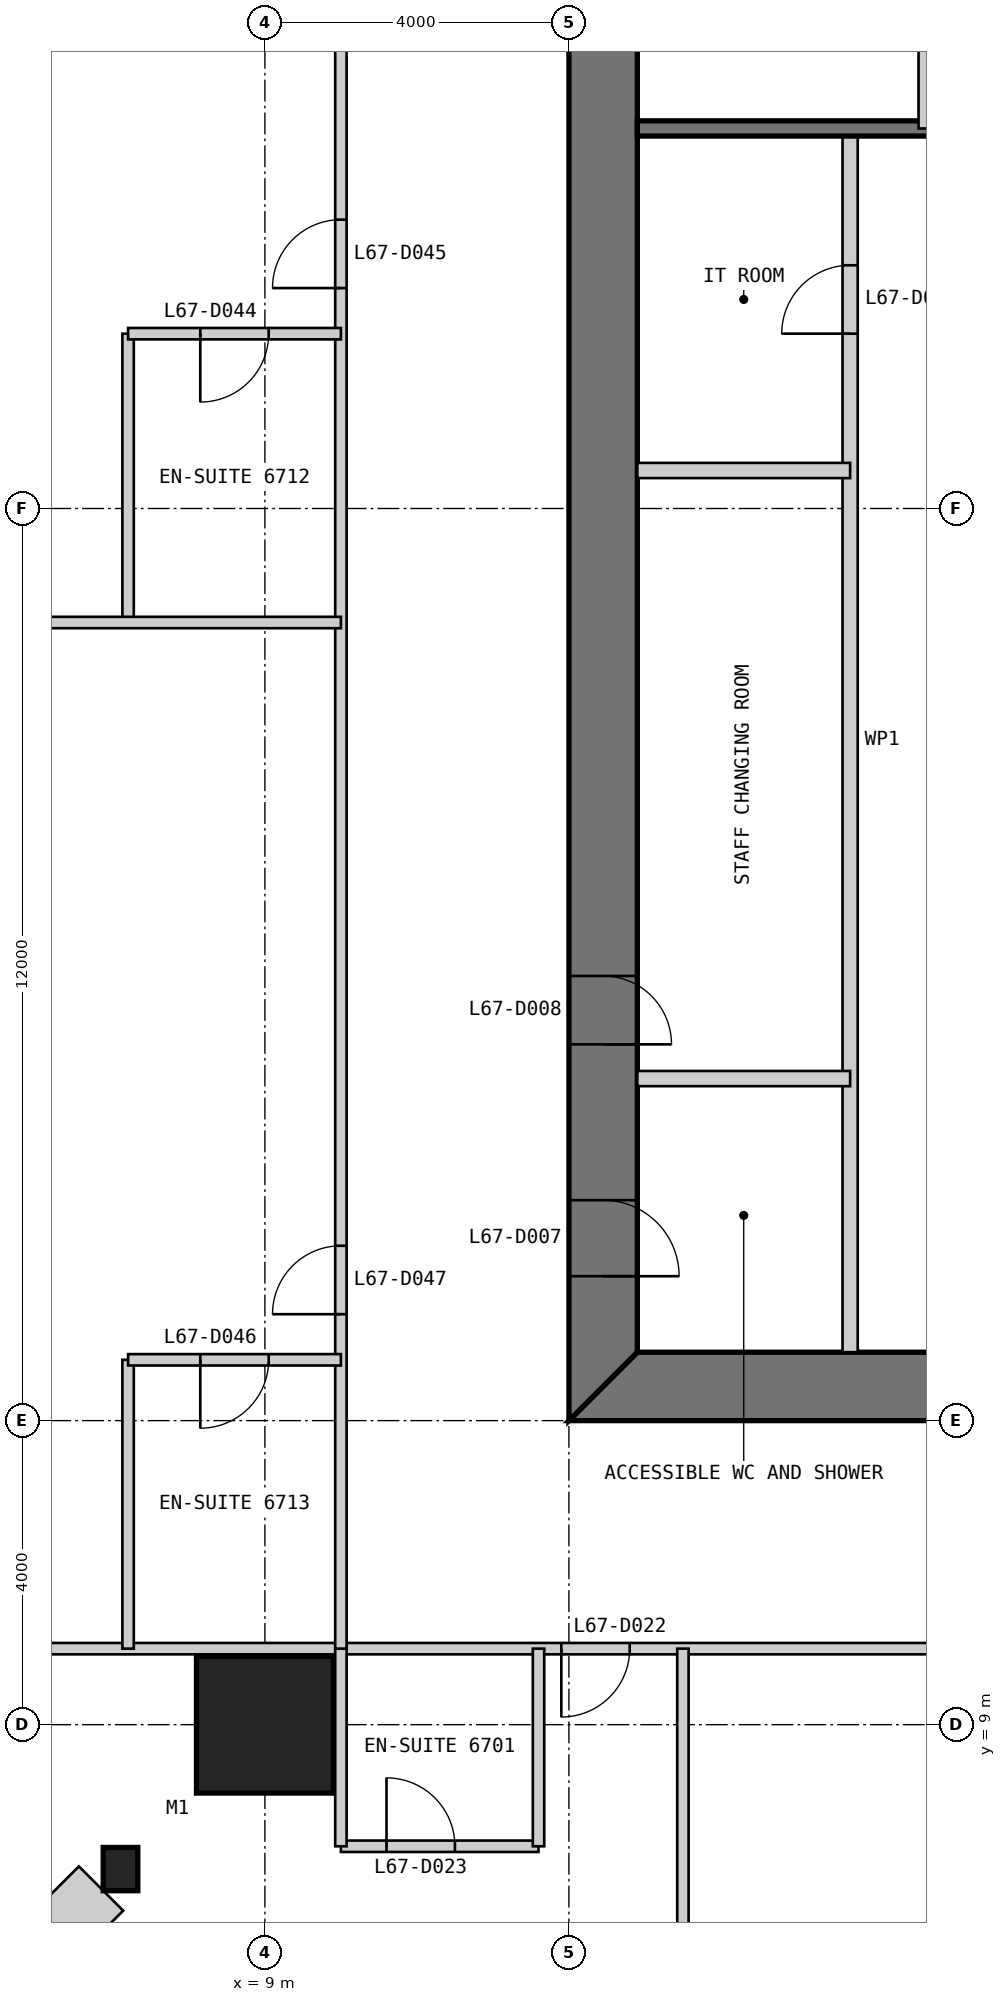
"""IFC4 building model, lengths in metres.
Left out: names, types, materials, properties, quantities, classifications, styles, units other than length and angle.
Written with IfcOpenShell. Run it as: python <this file> out.ifc"""

import sys

from ifc_helpers import new_model, si_unit, direction, frame, frame_2d, origin, origin_2d, place, context, subcontext, project, spatial, polyline, rectangle, i_section, outline, extrude, element, fill, save


model = new_model("IFC4")
c1 = context("Model", 3, precision=1e-05, world=origin(), true_north=direction((0.0, 1.0)))
c2 = subcontext(c1, "Body", "Model", "MODEL_VIEW")
j1 = project(units=[si_unit("LENGTHUNIT", "METRE"), si_unit("PLANEANGLEUNIT", "RADIAN")], contexts=[c1])
p1 = place(None, origin())
s1 = spatial("IfcSite", under=j1, at=p1, CompositionType="ELEMENT")
p2 = place(p1, origin())
s2 = spatial("IfcBuilding", under=s1, at=p2, CompositionType="ELEMENT")
p3 = place(p2, frame((0.0, 0.0, 279.8)))
s3 = spatial("IfcBuildingStorey", under=s2, at=p3, CompositionType="ELEMENT", Elevation=279.8)
p4 = place(p3, frame((9.0, 9.0, 0.0), z_axis=(0.0, 0.0, 1.0), x_axis=(1.0, 0.0, 0.0)))
e1 = element("IfcColumn", 1, at=p4, inside=s3, PredefinedType="COLUMN", context=c2, shape_type="SweptSolid", body=[
    extrude(rectangle(XDim=1.8, YDim=1.8, at=origin_2d()), origin(), (0.0, 0.0, 1.0), 3.4),
])
p5 = place(p3, frame((7.1, 7.1, 0.0), z_axis=(0.0, 0.0, 1.0), x_axis=(1.0, 0.0, 0.0)))
e2 = element("IfcColumn", 2, at=p5, inside=s3, PredefinedType="COLUMN", context=c2, shape_type="SweptSolid", body=[
    extrude(i_section(OverallWidth=0.455, OverallDepth=0.569, WebThickness=0.078, FlangeThickness=0.125, at=origin_2d()), origin(), (0.0, 0.0, 1.0), 3.4),
])
p6 = place(p3, frame((13.0, 13.45, 0.0), z_axis=(0.0, 0.0, 1.0), x_axis=(1.0, 0.0, 0.0)))
e3 = element("IfcWall", 3, at=p6, inside=s3, PredefinedType="SHEAR", context=c2, shape_type="SweptSolid", body=[
    extrude(outline(polyline([(0.0, -0.45), (24.0, -0.45), (23.1, 0.45), (0.9, 0.45), (0.0, -0.45)])), origin(), (0.0, 0.0, 1.0), 3.4),
])
p7 = place(p6, frame((4.9, 0.0, 0.0)))
e4 = element("IfcOpeningElement", 4, at=p7, cuts=e3, PredefinedType="OPENING", context=c2, shape_type="SweptSolid", body=[
    extrude(rectangle(XDim=1.0, YDim=2.2, at=frame_2d((0.5, 1.1))), frame((0.0, 0.46, 0.0), z_axis=(0.0, -1.0, 0.0), x_axis=(1.0, 0.0, 0.0)), (0.0, 0.0, 1.0), 0.92),
])
p8 = place(p6, frame((8.9, 0.0, 0.0)))
e5 = element("IfcOpeningElement", 5, at=p8, cuts=e3, PredefinedType="OPENING", context=c2, shape_type="SweptSolid", body=[
    extrude(rectangle(XDim=1.1, YDim=2.2, at=frame_2d((0.55, 1.1))), frame((0.0, 0.46, 0.0), z_axis=(0.0, -1.0, 0.0), x_axis=(1.0, 0.0, 0.0)), (0.0, 0.0, 1.0), 0.92),
])
p9 = place(p6, frame((15.05, 0.0, 0.0)))
e6 = element("IfcOpeningElement", 6, at=p9, cuts=e3, PredefinedType="OPENING", context=c2, shape_type="SweptSolid", body=[
    extrude(rectangle(XDim=0.9, YDim=2.2, at=frame_2d((0.45, 1.1))), frame((0.0, 0.46, 0.0), z_axis=(0.0, -1.0, 0.0), x_axis=(1.0, 0.0, 0.0)), (0.0, 0.0, 1.0), 0.92),
])
p10 = place(p6, frame((17.9, 0.0, 0.0)))
e7 = element("IfcOpeningElement", 7, at=p10, cuts=e3, PredefinedType="OPENING", context=c2, shape_type="SweptSolid", body=[
    extrude(rectangle(XDim=1.0, YDim=2.2, at=frame_2d((0.5, 1.1))), frame((0.0, 0.46, 0.0), z_axis=(0.0, -1.0, 0.0), x_axis=(1.0, 0.0, 0.0)), (0.0, 0.0, 1.0), 0.92),
])
p11 = place(p6, frame((21.4, 0.0, 0.0)))
e8 = element("IfcOpeningElement", 8, at=p11, cuts=e3, PredefinedType="OPENING", context=c2, shape_type="SweptSolid", body=[
    extrude(rectangle(XDim=1.0, YDim=2.2, at=frame_2d((0.5, 1.1))), frame((0.0, 0.46, 0.0), z_axis=(0.0, -1.0, 0.0), x_axis=(1.0, 0.0, 0.0)), (0.0, 0.0, 1.0), 0.92),
])
p12 = place(p3, frame((13.45, 36.1, 0.0), z_axis=(0.0, 0.0, 1.0), x_axis=(0.0, -1.0, 0.0)))
e9 = element("IfcWall", 9, at=p12, inside=s3, PredefinedType="SHEAR", context=c2, shape_type="SweptSolid", body=[
    extrude(outline(polyline([(-0.9, -0.45), (23.1, -0.45), (22.2, 0.45), (0.0, 0.45), (-0.9, -0.45)])), origin(), (0.0, 0.0, 1.0), 3.4),
])
p13 = place(p12, frame((20.2, 0.0, 0.0)))
e10 = element("IfcOpeningElement", 10, at=p13, cuts=e9, PredefinedType="OPENING", context=c2, shape_type="SweptSolid", body=[
    extrude(rectangle(XDim=1.0, YDim=2.2, at=frame_2d((0.5, 1.1))), frame((0.0, 0.46, 0.0), z_axis=(0.0, -1.0, 0.0), x_axis=(1.0, 0.0, 0.0)), (0.0, 0.0, 1.0), 0.92),
])
p14 = place(p12, frame((17.25, 0.0, 0.0)))
e11 = element("IfcOpeningElement", 11, at=p14, cuts=e9, PredefinedType="OPENING", context=c2, shape_type="SweptSolid", body=[
    extrude(rectangle(XDim=0.9, YDim=2.2, at=frame_2d((0.45, 1.1))), frame((0.0, 0.46, 0.0), z_axis=(0.0, -1.0, 0.0), x_axis=(1.0, 0.0, 0.0)), (0.0, 0.0, 1.0), 0.92),
])
p15 = place(p3, frame((16.7, 13.9, 0.0), z_axis=(0.0, 0.0, 1.0), x_axis=(0.0, 1.0, 0.0)))
e12 = element("IfcWall", 12, at=p15, inside=s3, PredefinedType="PARTITIONING", context=c2, shape_type="SweptSolid", body=[
    extrude(rectangle(XDim=16.1, YDim=0.2, at=frame_2d((8.05, 0.0))), origin(), (0.0, 0.0, 1.0), 3.2),
])
p16 = place(p15, frame((13.4, 0.0, 0.0)))
e13 = element("IfcOpeningElement", 13, at=p16, cuts=e12, PredefinedType="OPENING", context=c2, shape_type="SweptSolid", body=[
    extrude(rectangle(XDim=0.9, YDim=2.2, at=frame_2d((0.45, 1.1))), frame((0.0, 0.11, 0.0), z_axis=(0.0, -1.0, 0.0), x_axis=(1.0, 0.0, 0.0)), (0.0, 0.0, 1.0), 0.22),
])
for number, where, z_axis, x_axis in (
    (14, (13.9, 17.5, 0.0), (0.0, 0.0, 1.0), (1.0, 0.0, 0.0)),
    (15, (13.9, 25.5, 0.0), (0.0, 0.0, 1.0), (1.0, 0.0, 0.0)),
):
    element("IfcWall", number, at=place(p3, frame(where, z_axis=z_axis, x_axis=x_axis)), inside=s3, PredefinedType="PARTITIONING", context=c2, shape_type="SweptSolid", body=[
        extrude(rectangle(XDim=2.8, YDim=0.2, at=frame_2d((1.4, 0.0))), origin(), (0.0, 0.0, 1.0), 3.2),
    ])
p17 = place(p3, frame((29.7, 30.0, 0.0), z_axis=(0.0, 0.0, 1.0), x_axis=(-1.0, 0.0, 0.0)))
e16 = element("IfcWall", 16, at=p17, inside=s3, PredefinedType="SOLIDWALL", context=c2, shape_type="SweptSolid", body=[
    extrude(rectangle(XDim=15.8, YDim=0.2, at=frame_2d((7.9, 0.0))), origin(), (0.0, 0.0, 1.0), 3.2),
])
p18 = place(p3, frame((17.7, 36.1, 0.0), z_axis=(0.0, 0.0, 1.0), x_axis=(0.0, -1.0, 0.0)))
e17 = element("IfcWall", 17, at=p18, inside=s3, PredefinedType="PARTITIONING", context=c2, shape_type="SweptSolid", body=[
    extrude(rectangle(XDim=6.1, YDim=0.2, at=frame_2d((3.05, 0.0))), origin(), (0.0, 0.0, 1.0), 3.2),
])
p19 = place(p3, frame((10.0, 10.0, 0.0), z_axis=(0.0, 0.0, 1.0), x_axis=(1.0, 0.0, 0.0)))
e18 = element("IfcWall", 18, at=p19, inside=s3, PredefinedType="PARTITIONING", context=c2, shape_type="SweptSolid", body=[
    extrude(rectangle(XDim=30.0, YDim=0.15, at=frame_2d((15.0, 0.0))), origin(), (0.0, 0.0, 1.0), 3.25),
])
p20 = place(p19, frame((2.9, 0.0, 0.0)))
e19 = element("IfcOpeningElement", 19, at=p20, cuts=e18, PredefinedType="OPENING", context=c2, shape_type="SweptSolid", body=[
    extrude(rectangle(XDim=0.9, YDim=2.1, at=frame_2d((0.45, 1.05))), frame((0.0, 0.085, 0.0), z_axis=(0.0, -1.0, 0.0), x_axis=(1.0, 0.0, 0.0)), (0.0, 0.0, 1.0), 0.17),
])
p21 = place(p19, frame((11.2, 0.0, 0.0)))
e20 = element("IfcOpeningElement", 20, at=p21, cuts=e18, PredefinedType="OPENING", context=c2, shape_type="SweptSolid", body=[
    extrude(rectangle(XDim=0.9, YDim=2.1, at=frame_2d((0.45, 1.05))), frame((0.0, 0.085, 0.0), z_axis=(0.0, -1.0, 0.0), x_axis=(1.0, 0.0, 0.0)), (0.0, 0.0, 1.0), 0.17),
])
p22 = place(p19, frame((17.6, 0.0, 0.0)))
e21 = element("IfcOpeningElement", 21, at=p22, cuts=e18, PredefinedType="OPENING", context=c2, shape_type="SweptSolid", body=[
    extrude(rectangle(XDim=0.9, YDim=2.1, at=frame_2d((0.45, 1.05))), frame((0.0, 0.085, 0.0), z_axis=(0.0, -1.0, 0.0), x_axis=(1.0, 0.0, 0.0)), (0.0, 0.0, 1.0), 0.17),
])
p23 = place(p19, frame((26.3, 0.0, 0.0)))
e22 = element("IfcOpeningElement", 22, at=p23, cuts=e18, PredefinedType="OPENING", context=c2, shape_type="SweptSolid", body=[
    extrude(rectangle(XDim=1.0, YDim=2.1, at=frame_2d((0.5, 1.05))), frame((0.0, 0.085, 0.0), z_axis=(0.0, -1.0, 0.0), x_axis=(1.0, 0.0, 0.0)), (0.0, 0.0, 1.0), 0.17),
])
p24 = place(p3, frame((0.15, 10.0, 0.0), z_axis=(0.0, 0.0, 1.0), x_axis=(1.0, 0.0, 0.0)))
e23 = element("IfcWall", 23, at=p24, inside=s3, PredefinedType="PARTITIONING", context=c2, shape_type="SweptSolid", body=[
    extrude(rectangle(XDim=9.85, YDim=0.15, at=frame_2d((4.925, 0.0))), origin(), (0.0, 0.0, 1.0), 3.25),
])
p25 = place(p3, frame((10.0, 7.4, 0.0), z_axis=(0.0, 0.0, 1.0), x_axis=(1.0, 0.0, 0.0)))
e24 = element("IfcWall", 24, at=p25, inside=s3, PredefinedType="PARTITIONING", context=c2, shape_type="SweptSolid", body=[
    extrude(rectangle(XDim=2.6, YDim=0.15, at=frame_2d((1.3, 0.0))), origin(), (0.0, 0.0, 1.0), 3.25),
])
p26 = place(p25, frame((0.6, 0.0, 0.0)))
e25 = element("IfcOpeningElement", 25, at=p26, cuts=e24, PredefinedType="OPENING", context=c2, shape_type="SweptSolid", body=[
    extrude(rectangle(XDim=0.9, YDim=2.1, at=frame_2d((0.45, 1.05))), frame((0.0, 0.085, 0.0), z_axis=(0.0, -1.0, 0.0), x_axis=(1.0, 0.0, 0.0)), (0.0, 0.0, 1.0), 0.17),
])
for number, where, z_axis, x_axis in (
    (26, (10.0, 7.4, 0.0), (0.0, 0.0, 1.0), (0.0, 1.0, 0.0)),
    (27, (12.6, 7.4, 0.0), (0.0, 0.0, 1.0), (0.0, 1.0, 0.0)),
):
    element("IfcWall", number, at=place(p3, frame(where, z_axis=z_axis, x_axis=x_axis)), inside=s3, PredefinedType="PARTITIONING", context=c2, shape_type="SweptSolid", body=[
        extrude(rectangle(XDim=2.6, YDim=0.15, at=frame_2d((1.3, 0.0))), origin(), (0.0, 0.0, 1.0), 3.25),
    ])
p27 = place(p3, frame((14.5, 0.15, 0.0), z_axis=(0.0, 0.0, 1.0), x_axis=(0.0, 1.0, 0.0)))
e28 = element("IfcWall", 28, at=p27, inside=s3, PredefinedType="PARTITIONING", context=c2, shape_type="SweptSolid", body=[
    extrude(rectangle(XDim=9.85, YDim=0.15, at=frame_2d((4.925, 0.0))), origin(), (0.0, 0.0, 1.0), 3.25),
])
p28 = place(p3, frame((10.0, 40.0, 0.0), z_axis=(0.0, 0.0, 1.0), x_axis=(0.0, -1.0, 0.0)))
e29 = element("IfcWall", 29, at=p28, inside=s3, PredefinedType="PARTITIONING", context=c2, shape_type="SweptSolid", body=[
    extrude(rectangle(XDim=30.0, YDim=0.15, at=frame_2d((15.0, 0.0))), origin(), (0.0, 0.0, 1.0), 2.638),
])
p29 = place(p28, frame((2.9, 0.0, 0.0)))
e30 = element("IfcOpeningElement", 30, at=p29, cuts=e29, PredefinedType="OPENING", context=c2, shape_type="SweptSolid", body=[
    extrude(rectangle(XDim=0.9, YDim=2.1, at=frame_2d((0.45, 1.05))), frame((0.0, 0.085, 0.0), z_axis=(0.0, -1.0, 0.0), x_axis=(1.0, 0.0, 0.0)), (0.0, 0.0, 1.0), 0.17),
])
p30 = place(p28, frame((11.2, 0.0, 0.0)))
e31 = element("IfcOpeningElement", 31, at=p30, cuts=e29, PredefinedType="OPENING", context=c2, shape_type="SweptSolid", body=[
    extrude(rectangle(XDim=0.9, YDim=2.1, at=frame_2d((0.45, 1.05))), frame((0.0, 0.085, 0.0), z_axis=(0.0, -1.0, 0.0), x_axis=(1.0, 0.0, 0.0)), (0.0, 0.0, 1.0), 0.17),
])
p31 = place(p28, frame((24.7, 0.0, 0.0)))
e32 = element("IfcOpeningElement", 32, at=p31, cuts=e29, PredefinedType="OPENING", context=c2, shape_type="SweptSolid", body=[
    extrude(rectangle(XDim=0.9, YDim=2.1, at=frame_2d((0.45, 1.05))), frame((0.0, 0.085, 0.0), z_axis=(0.0, -1.0, 0.0), x_axis=(1.0, 0.0, 0.0)), (0.0, 0.0, 1.0), 0.17),
])
p32 = place(p3, frame((7.2, 27.3, 0.0), z_axis=(0.0, 0.0, 1.0), x_axis=(0.0, -1.0, 0.0)))
e33 = element("IfcWall", 33, at=p32, inside=s3, PredefinedType="PARTITIONING", context=c2, shape_type="SweptSolid", body=[
    extrude(rectangle(XDim=3.8, YDim=0.15, at=frame_2d((1.9, 0.0))), origin(), (0.0, 0.0, 1.0), 3.25),
])
p33 = place(p3, frame((7.2, 27.3, 0.0), z_axis=(0.0, 0.0, 1.0), x_axis=(1.0, 0.0, 0.0)))
e34 = element("IfcWall", 34, at=p33, inside=s3, PredefinedType="PARTITIONING", context=c2, shape_type="SweptSolid", body=[
    extrude(rectangle(XDim=2.8, YDim=0.15, at=frame_2d((1.4, 0.0))), origin(), (0.0, 0.0, 1.0), 3.25),
])
p34 = place(p33, frame((0.95, 0.0, 0.0)))
e35 = element("IfcOpeningElement", 35, at=p34, cuts=e34, PredefinedType="OPENING", context=c2, shape_type="SweptSolid", body=[
    extrude(rectangle(XDim=0.9, YDim=2.1, at=frame_2d((0.45, 1.05))), frame((0.0, 0.085, 0.0), z_axis=(0.0, -1.0, 0.0), x_axis=(1.0, 0.0, 0.0)), (0.0, 0.0, 1.0), 0.17),
])
p35 = place(p3, frame((0.15, 23.5, 0.0), z_axis=(0.0, 0.0, 1.0), x_axis=(1.0, 0.0, 0.0)))
e36 = element("IfcWall", 36, at=p35, inside=s3, PredefinedType="PARTITIONING", context=c2, shape_type="SweptSolid", body=[
    extrude(rectangle(XDim=9.85, YDim=0.15, at=frame_2d((4.925, 0.0))), origin(), (0.0, 0.0, 1.0), 3.25),
])
p36 = place(p3, frame((7.2, 13.8, 0.0), z_axis=(0.0, 0.0, 1.0), x_axis=(0.0, -1.0, 0.0)))
e37 = element("IfcWall", 37, at=p36, inside=s3, PredefinedType="PARTITIONING", context=c2, shape_type="SweptSolid", body=[
    extrude(rectangle(XDim=3.8, YDim=0.15, at=frame_2d((1.9, 0.0))), origin(), (0.0, 0.0, 1.0), 3.25),
])
p37 = place(p3, frame((7.2, 13.8, 0.0), z_axis=(0.0, 0.0, 1.0), x_axis=(1.0, 0.0, 0.0)))
e38 = element("IfcWall", 38, at=p37, inside=s3, PredefinedType="PARTITIONING", context=c2, shape_type="SweptSolid", body=[
    extrude(rectangle(XDim=2.8, YDim=0.15, at=frame_2d((1.4, 0.0))), origin(), (0.0, 0.0, 1.0), 3.25),
])
p38 = place(p37, frame((0.95, 0.0, 0.0)))
e39 = element("IfcOpeningElement", 39, at=p38, cuts=e38, PredefinedType="OPENING", context=c2, shape_type="SweptSolid", body=[
    extrude(rectangle(XDim=0.9, YDim=2.1, at=frame_2d((0.45, 1.05))), frame((0.0, 0.085, 0.0), z_axis=(0.0, -1.0, 0.0), x_axis=(1.0, 0.0, 0.0)), (0.0, 0.0, 1.0), 0.17),
])
p39 = place(p3, frame((6.134, 6.134, 0.0), z_axis=(0.0, 0.0, 1.0), x_axis=(0.707106781187, 0.707106781187, 0.0)))
e40 = element("IfcWall", 40, at=p39, inside=s3, PredefinedType="PARTITIONING", context=c2, shape_type="SweptSolid", body=[
    extrude(rectangle(XDim=1.004, YDim=0.824, at=frame_2d((0.502, 0.0))), origin(), (0.0, 0.0, 1.0), 3.25),
])
p40 = place(p13, origin())
e41 = element("IfcDoor", 41, at=p40, inside=s3, OperationType="SINGLE_SWING_RIGHT", PredefinedType="DOOR", context=c2, shape_type="SweptSolid", body=[
    extrude(rectangle(XDim=1.0, YDim=2.2, at=frame_2d((0.5, 1.1))), frame((0.0, 0.025, 0.0), z_axis=(0.0, -1.0, 0.0), x_axis=(1.0, 0.0, 0.0)), (0.0, 0.0, 1.0), 0.05),
    extrude(outline(polyline([(0.0, 0.0), (0.04, 0.0), (0.04, 2.16), (0.96, 2.16), (0.96, 0.0), (1.0, 0.0), (1.0, 2.2), (0.0, 2.2), (0.0, 0.0)])), frame((0.0, 0.3, 0.0), z_axis=(0.0, -1.0, 0.0), x_axis=(1.0, 0.0, 0.0)), (0.0, 0.0, 1.0), 0.6),
])
fill(e10, e41)
p41 = place(p14, origin())
e42 = element("IfcDoor", 42, at=p41, inside=s3, OperationType="SINGLE_SWING_RIGHT", PredefinedType="DOOR", context=c2, shape_type="SweptSolid", body=[
    extrude(rectangle(XDim=0.9, YDim=2.2, at=frame_2d((0.45, 1.1))), frame((0.0, 0.025, 0.0), z_axis=(0.0, -1.0, 0.0), x_axis=(1.0, 0.0, 0.0)), (0.0, 0.0, 1.0), 0.05),
    extrude(outline(polyline([(0.0, 0.0), (0.04, 0.0), (0.04, 2.16), (0.86, 2.16), (0.86, 0.0), (0.9, 0.0), (0.9, 2.2), (0.0, 2.2), (0.0, 0.0)])), frame((0.0, 0.3, 0.0), z_axis=(0.0, -1.0, 0.0), x_axis=(1.0, 0.0, 0.0)), (0.0, 0.0, 1.0), 0.6),
])
fill(e11, e42)
p42 = place(p16, origin())
e43 = element("IfcDoor", 43, at=p42, inside=s3, OperationType="SINGLE_SWING_LEFT", PredefinedType="DOOR", context=c2, shape_type="SweptSolid", body=[
    extrude(rectangle(XDim=0.9, YDim=2.2, at=frame_2d((0.45, 1.1))), frame((0.0, 0.025, 0.0), z_axis=(0.0, -1.0, 0.0), x_axis=(1.0, 0.0, 0.0)), (0.0, 0.0, 1.0), 0.05),
])
fill(e13, e43)
p43 = place(p20, frame((0.9, 0.0, 0.0), z_axis=(0.0, 0.0, 1.0), x_axis=(-1.0, 0.0, 0.0)))
e44 = element("IfcDoor", 44, at=p43, inside=s3, OperationType="SINGLE_SWING_RIGHT", PredefinedType="DOOR", context=c2, shape_type="SweptSolid", body=[
    extrude(rectangle(XDim=0.9, YDim=2.1, at=frame_2d((0.45, 1.05))), frame((0.0, 0.025, 0.0), z_axis=(0.0, -1.0, 0.0), x_axis=(1.0, 0.0, 0.0)), (0.0, 0.0, 1.0), 0.05),
])
fill(e19, e44)
p44 = place(p26, origin())
e45 = element("IfcDoor", 45, at=p44, inside=s3, OperationType="SINGLE_SWING_LEFT", PredefinedType="DOOR", context=c2, shape_type="SweptSolid", body=[
    extrude(rectangle(XDim=0.9, YDim=2.1, at=frame_2d((0.45, 1.05))), frame((0.0, 0.025, 0.0), z_axis=(0.0, -1.0, 0.0), x_axis=(1.0, 0.0, 0.0)), (0.0, 0.0, 1.0), 0.05),
])
fill(e25, e45)
p45 = place(p34, frame((0.9, 0.0, 0.0), z_axis=(0.0, 0.0, 1.0), x_axis=(-1.0, 0.0, 0.0)))
e46 = element("IfcDoor", 46, at=p45, inside=s3, OperationType="SINGLE_SWING_RIGHT", PredefinedType="DOOR", context=c2, shape_type="SweptSolid", body=[
    extrude(rectangle(XDim=0.9, YDim=2.1, at=frame_2d((0.45, 1.05))), frame((0.0, 0.025, 0.0), z_axis=(0.0, -1.0, 0.0), x_axis=(1.0, 0.0, 0.0)), (0.0, 0.0, 1.0), 0.05),
])
fill(e35, e46)
p46 = place(p30, frame((0.9, 0.0, 0.0), z_axis=(0.0, 0.0, 1.0), x_axis=(-1.0, 0.0, 0.0)))
e47 = element("IfcDoor", 47, at=p46, inside=s3, OperationType="SINGLE_SWING_LEFT", PredefinedType="DOOR", context=c2, shape_type="SweptSolid", body=[
    extrude(rectangle(XDim=0.9, YDim=2.1, at=frame_2d((0.45, 1.05))), frame((0.0, 0.025, 0.0), z_axis=(0.0, -1.0, 0.0), x_axis=(1.0, 0.0, 0.0)), (0.0, 0.0, 1.0), 0.05),
])
fill(e31, e47)
p47 = place(p38, frame((0.9, 0.0, 0.0), z_axis=(0.0, 0.0, 1.0), x_axis=(-1.0, 0.0, 0.0)))
e48 = element("IfcDoor", 48, at=p47, inside=s3, OperationType="SINGLE_SWING_RIGHT", PredefinedType="DOOR", context=c2, shape_type="SweptSolid", body=[
    extrude(rectangle(XDim=0.9, YDim=2.1, at=frame_2d((0.45, 1.05))), frame((0.0, 0.025, 0.0), z_axis=(0.0, -1.0, 0.0), x_axis=(1.0, 0.0, 0.0)), (0.0, 0.0, 1.0), 0.05),
])
fill(e39, e48)
p48 = place(p31, frame((0.9, 0.0, 0.0), z_axis=(0.0, 0.0, 1.0), x_axis=(-1.0, 0.0, 0.0)))
e49 = element("IfcDoor", 49, at=p48, inside=s3, OperationType="SINGLE_SWING_LEFT", PredefinedType="DOOR", context=c2, shape_type="SweptSolid", body=[
    extrude(rectangle(XDim=0.9, YDim=2.1, at=frame_2d((0.45, 1.05))), frame((0.0, 0.025, 0.0), z_axis=(0.0, -1.0, 0.0), x_axis=(1.0, 0.0, 0.0)), (0.0, 0.0, 1.0), 0.05),
])
fill(e32, e49)
save(model, sys.argv[1])
